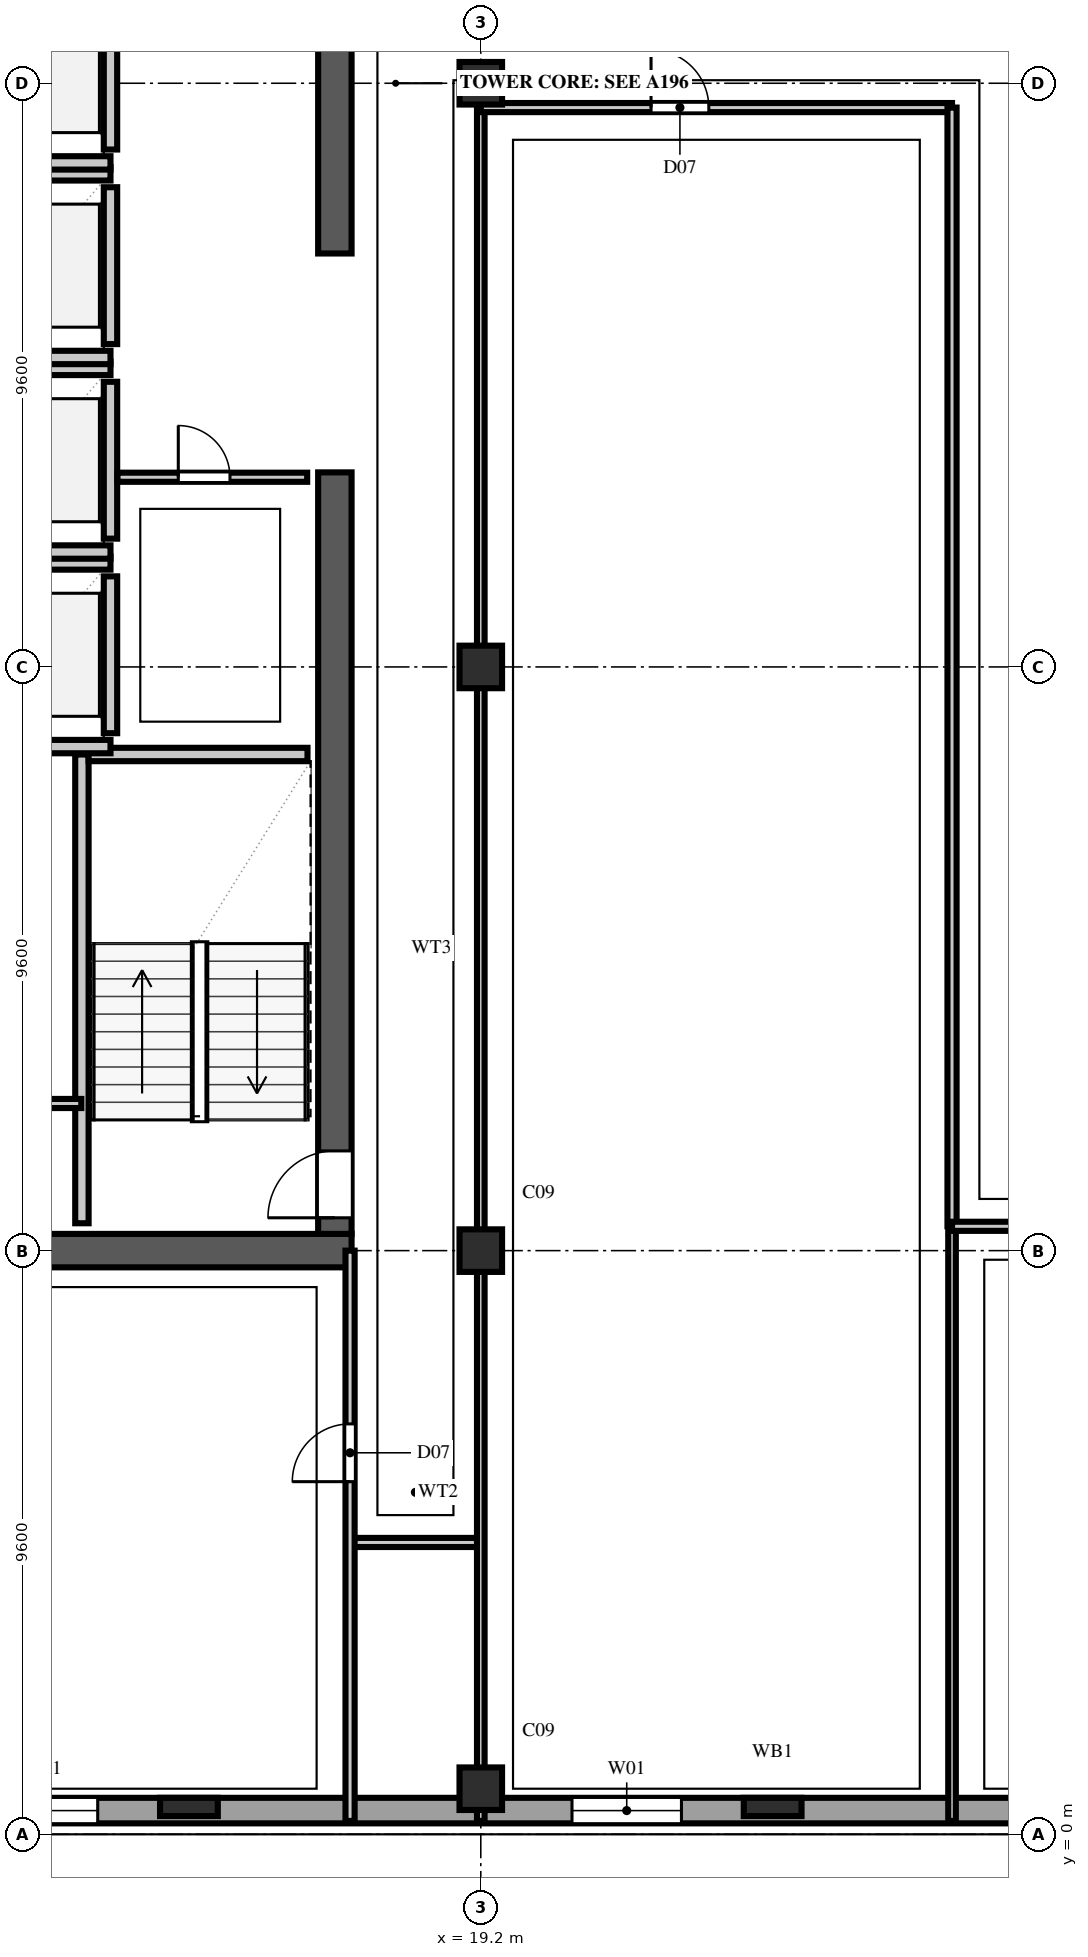
"""IFC4 building model, lengths in metres.
Left out: names, types, materials, properties, quantities, classifications, styles, units other than length and angle.
Written with IfcOpenShell. Run it as: python <this file> out.ifc"""

import sys

from ifc_helpers import new_model, si_unit, direction, frame, frame_2d, origin, origin_2d, place, context, subcontext, project, spatial, rectangle, extrude, element, fill, save


model = new_model("IFC4")
c1 = context("Model", 3, precision=1e-05, world=origin(), true_north=direction((0.0, 1.0)))
c2 = subcontext(c1, "Body", "Model", "MODEL_VIEW")
j1 = project(units=[si_unit("LENGTHUNIT", "METRE"), si_unit("PLANEANGLEUNIT", "RADIAN")], contexts=[c1])
p1 = place(None, origin())
s1 = spatial("IfcSite", under=j1, at=p1, CompositionType="ELEMENT")
p2 = place(p1, origin())
s2 = spatial("IfcBuilding", under=s1, at=p2, CompositionType="ELEMENT")
p3 = place(p2, frame((0.0, 0.0, 292.4)))
s3 = spatial("IfcBuildingStorey", under=s2, at=p3, CompositionType="ELEMENT", Elevation=292.4)
p4 = place(p3, frame((2.475, 9.6, 0.0), z_axis=(0.0, 0.0, 1.0), x_axis=(1.0, 0.0, 0.0)))
e1 = element("IfcWall", 1, at=p4, inside=s3, PredefinedType="SHEAR", context=c2, shape_type="SweptSolid", body=[
    extrude(rectangle(XDim=14.6, YDim=0.55, at=frame_2d((7.3, 0.0))), origin(), (0.0, 0.0, 1.0), 3.54),
])
p5 = place(p3, frame((16.8, 9.875, 0.0), z_axis=(0.0, 0.0, 1.0), x_axis=(0.0, 1.0, 0.0)))
e2 = element("IfcWall", 2, at=p5, inside=s3, PredefinedType="SHEAR", context=c2, shape_type="SweptSolid", body=[
    extrude(rectangle(XDim=12.525, YDim=0.55, at=frame_2d((6.262, 0.0))), origin(), (0.0, 0.0, 1.0), 3.54),
])
p6 = place(p5, frame((0.265, 0.0, 0.0)))
e3 = element("IfcOpeningElement", 3, at=p6, cuts=e2, PredefinedType="OPENING", context=c2, shape_type="SweptSolid", body=[
    extrude(rectangle(XDim=1.1, YDim=2.2, at=frame_2d((0.55, 1.1))), frame((0.0, 0.287, 0.0), z_axis=(0.0, -1.0, 0.0), x_axis=(1.0, 0.0, 0.0)), (0.0, 0.0, 1.0), 0.574),
])
p7 = place(p3, frame((16.8, 26.0, 0.0), z_axis=(0.0, 0.0, 1.0), x_axis=(0.0, 1.0, 0.0)))
e4 = element("IfcWall", 4, at=p7, inside=s3, PredefinedType="SHEAR", context=c2, shape_type="SweptSolid", body=[
    extrude(rectangle(XDim=7.8, YDim=0.55, at=frame_2d((3.9, 0.0))), origin(), (0.0, 0.0, 1.0), 3.54),
])
for number, where, z_axis, x_axis in (
    (5, (19.2, 0.75, 0.0), (0.0, 0.0, 1.0), (1.0, 0.0, 0.0)),
    (6, (19.2, 9.6, 0.0), (0.0, 0.0, 1.0), (1.0, 0.0, 0.0)),
    (7, (19.2, 19.2, 0.0), (0.0, 0.0, 1.0), (1.0, 0.0, 0.0)),
    (8, (19.2, 28.8, 0.0), (0.0, 0.0, 1.0), (1.0, 0.0, 0.0)),
):
    element("IfcColumn", number, at=place(p3, frame(where, z_axis=z_axis, x_axis=x_axis)), inside=s3, PredefinedType="COLUMN", context=c2, shape_type="SweptSolid", body=[
        extrude(rectangle(XDim=0.7, YDim=0.7, at=origin_2d()), origin(), (0.0, 0.0, 1.0), 3.8),
    ])
for number, where, z_axis, x_axis in (
    (9, (14.4, 0.45, 0.0), (0.0, 0.0, 1.0), (1.0, 0.0, 0.0)),
    (10, (24.0, 0.45, 0.0), (0.0, 0.0, 1.0), (1.0, 0.0, 0.0)),
):
    element("IfcColumn", number, at=place(p3, frame(where, z_axis=z_axis, x_axis=x_axis)), inside=s3, PredefinedType="PILASTER", context=c2, shape_type="SweptSolid", body=[
        extrude(rectangle(XDim=0.95, YDim=0.3, at=origin_2d()), origin(), (0.0, 0.0, 1.0), 3.8),
    ])
p8 = place(p3, frame((1.84, 0.39, 0.0), z_axis=(0.0, 0.0, 1.0), x_axis=(1.0, 0.0, 0.0)))
e11 = element("IfcWall", 11, at=p8, inside=s3, PredefinedType="SOLIDWALL", context=c2, shape_type="SweptSolid", body=[
    extrude(rectangle(XDim=44.32, YDim=0.42, at=frame_2d((22.16, 0.0))), origin(), (0.0, 0.0, 1.0), 3.54),
])
p9 = place(p8, frame((4.46, 0.0, 0.85)))
e12 = element("IfcOpeningElement", 12, at=p9, cuts=e11, PredefinedType="OPENING", context=c2, shape_type="SweptSolid", body=[
    extrude(rectangle(XDim=1.8, YDim=1.85, at=frame_2d((0.9, 0.925))), frame((0.0, 0.222, 0.0), z_axis=(0.0, -1.0, 0.0), x_axis=(1.0, 0.0, 0.0)), (0.0, 0.0, 1.0), 0.444),
])
p10 = place(p8, frame((9.26, 0.0, 0.85)))
e13 = element("IfcOpeningElement", 13, at=p10, cuts=e11, PredefinedType="OPENING", context=c2, shape_type="SweptSolid", body=[
    extrude(rectangle(XDim=1.8, YDim=1.85, at=frame_2d((0.9, 0.925))), frame((0.0, 0.222, 0.0), z_axis=(0.0, -1.0, 0.0), x_axis=(1.0, 0.0, 0.0)), (0.0, 0.0, 1.0), 0.444),
])
p11 = place(p8, frame((18.86, 0.0, 0.85)))
e14 = element("IfcOpeningElement", 14, at=p11, cuts=e11, PredefinedType="OPENING", context=c2, shape_type="SweptSolid", body=[
    extrude(rectangle(XDim=1.8, YDim=1.85, at=frame_2d((0.9, 0.925))), frame((0.0, 0.222, 0.0), z_axis=(0.0, -1.0, 0.0), x_axis=(1.0, 0.0, 0.0)), (0.0, 0.0, 1.0), 0.444),
])
p12 = place(p8, frame((28.46, 0.0, 0.85)))
e15 = element("IfcOpeningElement", 15, at=p12, cuts=e11, PredefinedType="OPENING", context=c2, shape_type="SweptSolid", body=[
    extrude(rectangle(XDim=1.8, YDim=1.85, at=frame_2d((0.9, 0.925))), frame((0.0, 0.222, 0.0), z_axis=(0.0, -1.0, 0.0), x_axis=(1.0, 0.0, 0.0)), (0.0, 0.0, 1.0), 0.444),
])
p13 = place(p8, frame((33.26, 0.0, 0.85)))
e16 = element("IfcOpeningElement", 16, at=p13, cuts=e11, PredefinedType="OPENING", context=c2, shape_type="SweptSolid", body=[
    extrude(rectangle(XDim=1.8, YDim=1.85, at=frame_2d((0.9, 0.925))), frame((0.0, 0.222, 0.0), z_axis=(0.0, -1.0, 0.0), x_axis=(1.0, 0.0, 0.0)), (0.0, 0.0, 1.0), 0.444),
])
p14 = place(p8, frame((38.06, 0.0, 0.85)))
e17 = element("IfcOpeningElement", 17, at=p14, cuts=e11, PredefinedType="OPENING", context=c2, shape_type="SweptSolid", body=[
    extrude(rectangle(XDim=1.8, YDim=1.85, at=frame_2d((0.9, 0.925))), frame((0.0, 0.222, 0.0), z_axis=(0.0, -1.0, 0.0), x_axis=(1.0, 0.0, 0.0)), (0.0, 0.0, 1.0), 0.444),
])
p15 = place(p3, frame((12.64, 10.05, 0.0), z_axis=(0.0, 0.0, 1.0), x_axis=(0.0, 1.0, 0.0)))
e18 = element("IfcWall", 18, at=p15, inside=s3, PredefinedType="SOLIDWALL", context=c2, shape_type="SweptSolid", body=[
    extrude(rectangle(XDim=7.71, YDim=0.22, at=frame_2d((3.855, 0.0))), origin(), (0.0, 0.0, 1.0), 3.54),
])
p16 = place(p3, frame((12.75, 17.76, 0.0), z_axis=(0.0, 0.0, 1.0), x_axis=(1.0, 0.0, 0.0)))
e19 = element("IfcWall", 19, at=p16, inside=s3, PredefinedType="SOLIDWALL", context=c2, shape_type="SweptSolid", body=[
    extrude(rectangle(XDim=3.6, YDim=0.22, at=frame_2d((1.8, 0.0))), origin(), (0.0, 0.0, 1.0), 3.54),
])
p17 = place(p3, frame((13.11, 18.11, 0.0), z_axis=(0.0, 0.0, 1.0), x_axis=(0.0, 1.0, 0.0)))
e20 = element("IfcWall", 20, at=p17, inside=s3, PredefinedType="SOLIDWALL", context=c2, shape_type="SweptSolid", body=[
    extrude(rectangle(XDim=2.58, YDim=0.22, at=frame_2d((1.29, 0.0))), origin(), (0.0, 0.0, 1.0), 3.54),
])
for number, where, z_axis, x_axis in (
    (21, (10.49, 17.89, 0.0), (0.0, 0.0, 1.0), (1.0, 0.0, 0.0)),
    (22, (10.49, 20.91, 0.0), (0.0, 0.0, 1.0), (1.0, 0.0, 0.0)),
):
    element("IfcWall", number, at=place(p3, frame(where, z_axis=z_axis, x_axis=x_axis)), inside=s3, PredefinedType="SOLIDWALL", context=c2, shape_type="SweptSolid", body=[
        extrude(rectangle(XDim=2.62, YDim=0.22, at=frame_2d((1.31, 0.0))), origin(), (0.0, 0.0, 1.0), 3.54),
    ])
p18 = place(p3, frame((13.11, 21.31, 0.0), z_axis=(0.0, 0.0, 1.0), x_axis=(0.0, 1.0, 0.0)))
e23 = element("IfcWall", 23, at=p18, inside=s3, PredefinedType="SOLIDWALL", context=c2, shape_type="SweptSolid", body=[
    extrude(rectangle(XDim=2.58, YDim=0.22, at=frame_2d((1.29, 0.0))), origin(), (0.0, 0.0, 1.0), 3.54),
])
for number, where, z_axis, x_axis in (
    (24, (10.49, 21.09, 0.0), (0.0, 0.0, 1.0), (1.0, 0.0, 0.0)),
    (25, (10.49, 24.11, 0.0), (0.0, 0.0, 1.0), (1.0, 0.0, 0.0)),
):
    element("IfcWall", number, at=place(p3, frame(where, z_axis=z_axis, x_axis=x_axis)), inside=s3, PredefinedType="SOLIDWALL", context=c2, shape_type="SweptSolid", body=[
        extrude(rectangle(XDim=2.62, YDim=0.22, at=frame_2d((1.31, 0.0))), origin(), (0.0, 0.0, 1.0), 3.54),
    ])
p19 = place(p3, frame((13.11, 24.51, 0.0), z_axis=(0.0, 0.0, 1.0), x_axis=(0.0, 1.0, 0.0)))
e26 = element("IfcWall", 26, at=p19, inside=s3, PredefinedType="SOLIDWALL", context=c2, shape_type="SweptSolid", body=[
    extrude(rectangle(XDim=2.58, YDim=0.22, at=frame_2d((1.29, 0.0))), origin(), (0.0, 0.0, 1.0), 3.54),
])
for number, where, z_axis, x_axis in (
    (27, (10.49, 24.29, 0.0), (0.0, 0.0, 1.0), (1.0, 0.0, 0.0)),
    (28, (10.49, 27.31, 0.0), (0.0, 0.0, 1.0), (1.0, 0.0, 0.0)),
):
    element("IfcWall", number, at=place(p3, frame(where, z_axis=z_axis, x_axis=x_axis)), inside=s3, PredefinedType="SOLIDWALL", context=c2, shape_type="SweptSolid", body=[
        extrude(rectangle(XDim=2.62, YDim=0.22, at=frame_2d((1.31, 0.0))), origin(), (0.0, 0.0, 1.0), 3.54),
    ])
p20 = place(p3, frame((13.11, 27.71, 0.0), z_axis=(0.0, 0.0, 1.0), x_axis=(0.0, 1.0, 0.0)))
e29 = element("IfcWall", 29, at=p20, inside=s3, PredefinedType="SOLIDWALL", context=c2, shape_type="SweptSolid", body=[
    extrude(rectangle(XDim=2.58, YDim=0.22, at=frame_2d((1.29, 0.0))), origin(), (0.0, 0.0, 1.0), 3.54),
])
p21 = place(p3, frame((10.49, 27.49, 0.0), z_axis=(0.0, 0.0, 1.0), x_axis=(1.0, 0.0, 0.0)))
e30 = element("IfcWall", 30, at=p21, inside=s3, PredefinedType="SOLIDWALL", context=c2, shape_type="SweptSolid", body=[
    extrude(rectangle(XDim=2.62, YDim=0.22, at=frame_2d((1.31, 0.0))), origin(), (0.0, 0.0, 1.0), 3.54),
])
p22 = place(p3, frame((10.55, 12.02, 0.0), z_axis=(0.0, 0.0, 1.0), x_axis=(1.0, 0.0, 0.0)))
e31 = element("IfcWall", 31, at=p22, inside=s3, PredefinedType="PARTITIONING", context=c2, shape_type="SweptSolid", body=[
    extrude(rectangle(XDim=2.08, YDim=0.15, at=frame_2d((1.04, 0.0))), origin(), (0.0, 0.0, 1.0), 3.54),
])
p23 = place(p22, frame((0.5, 0.0, 0.0)))
e32 = element("IfcOpeningElement", 32, at=p23, cuts=e31, PredefinedType="OPENING", context=c2, shape_type="SweptSolid", body=[
    extrude(rectangle(XDim=0.85, YDim=2.1, at=frame_2d((0.425, 1.05))), frame((0.0, 0.087, 0.0), z_axis=(0.0, -1.0, 0.0), x_axis=(1.0, 0.0, 0.0)), (0.0, 0.0, 1.0), 0.174),
])
p24 = place(p3, frame((13.225, 22.32, 0.0), z_axis=(0.0, 0.0, 1.0), x_axis=(1.0, 0.0, 0.0)))
e33 = element("IfcWall", 33, at=p24, inside=s3, PredefinedType="PARTITIONING", context=c2, shape_type="SweptSolid", body=[
    extrude(rectangle(XDim=3.12, YDim=0.15, at=frame_2d((1.56, 0.0))), origin(), (0.0, 0.0, 1.0), 3.54),
])
p25 = place(p24, frame((1.0, 0.0, 0.0)))
e34 = element("IfcOpeningElement", 34, at=p25, cuts=e33, PredefinedType="OPENING", context=c2, shape_type="SweptSolid", body=[
    extrude(rectangle(XDim=0.85, YDim=2.1, at=frame_2d((0.425, 1.05))), frame((0.0, 0.087, 0.0), z_axis=(0.0, -1.0, 0.0), x_axis=(1.0, 0.0, 0.0)), (0.0, 0.0, 1.0), 0.174),
])
p26 = place(p3, frame((17.05, 4.8, 0.0), z_axis=(0.0, 0.0, 1.0), x_axis=(1.0, 0.0, 0.0)))
e35 = element("IfcWall", 35, at=p26, inside=s3, PredefinedType="PARTITIONING", context=c2, shape_type="SweptSolid", body=[
    extrude(rectangle(XDim=2.15, YDim=0.15, at=frame_2d((1.075, 0.0))), origin(), (0.0, 0.0, 1.0), 3.54),
])
p27 = place(p3, frame((17.05, 0.22, 0.0), z_axis=(0.0, 0.0, 1.0), x_axis=(0.0, 1.0, 0.0)))
e36 = element("IfcWall", 36, at=p27, inside=s3, PredefinedType="PARTITIONING", context=c2, shape_type="SweptSolid", body=[
    extrude(rectangle(XDim=9.38, YDim=0.15, at=frame_2d((4.69, 0.0))), origin(), (0.0, 0.0, 1.0), 3.54),
])
p28 = place(p27, frame((5.58, 0.0, 0.0)))
e37 = element("IfcOpeningElement", 37, at=p28, cuts=e36, PredefinedType="OPENING", context=c2, shape_type="SweptSolid", body=[
    extrude(rectangle(XDim=0.95, YDim=2.15, at=frame_2d((0.475, 1.075))), frame((0.0, 0.087, 0.0), z_axis=(0.0, -1.0, 0.0), x_axis=(1.0, 0.0, 0.0)), (0.0, 0.0, 1.0), 0.174),
])
p29 = place(p3, frame((19.2, 0.22, 0.0), z_axis=(0.0, 0.0, 1.0), x_axis=(0.0, 1.0, 0.0)))
e38 = element("IfcWall", 38, at=p29, inside=s3, PredefinedType="PARTITIONING", context=c2, shape_type="SweptSolid", body=[
    extrude(rectangle(XDim=0.53, YDim=0.125, at=frame_2d((0.265, 0.0))), origin(), (0.0, 0.0, 1.0), 3.54),
])
p30 = place(p3, frame((19.2, 0.75, 0.0), z_axis=(0.0, 0.0, 1.0), x_axis=(0.0, 1.0, 0.0)))
e39 = element("IfcWall", 39, at=p30, inside=s3, PredefinedType="PARTITIONING", context=c2, shape_type="SweptSolid", body=[
    extrude(rectangle(XDim=27.65, YDim=0.125, at=frame_2d((13.825, 0.0))), origin(), (0.0, 0.0, 1.0), 3.184),
])
p31 = place(p3, frame((19.2, 28.4, 0.0), z_axis=(0.0, 0.0, 1.0), x_axis=(1.0, 0.0, 0.0)))
e40 = element("IfcWall", 40, at=p31, inside=s3, PredefinedType="PARTITIONING", context=c2, shape_type="SweptSolid", body=[
    extrude(rectangle(XDim=7.75, YDim=0.15, at=frame_2d((3.875, 0.0))), origin(), (0.0, 0.0, 1.0), 3.54),
])
p32 = place(p31, frame((2.8, 0.0, 0.0)))
e41 = element("IfcOpeningElement", 41, at=p32, cuts=e40, PredefinedType="OPENING", context=c2, shape_type="SweptSolid", body=[
    extrude(rectangle(XDim=0.95, YDim=2.15, at=frame_2d((0.475, 1.075))), frame((0.0, 0.087, 0.0), z_axis=(0.0, -1.0, 0.0), x_axis=(1.0, 0.0, 0.0)), (0.0, 0.0, 1.0), 0.174),
])
p33 = place(p3, frame((26.95, 0.22, 0.0), z_axis=(0.0, 0.0, 1.0), x_axis=(0.0, 1.0, 0.0)))
e42 = element("IfcWall", 42, at=p33, inside=s3, PredefinedType="PARTITIONING", context=c2, shape_type="SweptSolid", body=[
    extrude(rectangle(XDim=9.78, YDim=0.125, at=frame_2d((4.89, 0.0))), origin(), (0.0, 0.0, 1.0), 3.54),
])
p34 = place(p3, frame((26.95, 10.0, 0.0), z_axis=(0.0, 0.0, 1.0), x_axis=(0.0, 1.0, 0.0)))
e43 = element("IfcWall", 43, at=p34, inside=s3, PredefinedType="PARTITIONING", context=c2, shape_type="SweptSolid", body=[
    extrude(rectangle(XDim=18.4, YDim=0.15, at=frame_2d((9.2, 0.0))), origin(), (0.0, 0.0, 1.0), 3.54),
])
p35 = place(p3, frame((26.95, 10.0, 0.0), z_axis=(0.0, 0.0, 1.0), x_axis=(1.0, 0.0, 0.0)))
e44 = element("IfcWall", 44, at=p35, inside=s3, PredefinedType="PARTITIONING", context=c2, shape_type="SweptSolid", body=[
    extrude(rectangle(XDim=2.63, YDim=0.15, at=frame_2d((1.315, 0.0))), origin(), (0.0, 0.0, 1.0), 3.54),
])
p36 = place(p10, origin())
e45 = element("IfcWindow", 45, at=p36, inside=s3, PartitioningType="DOUBLE_PANEL_VERTICAL", PredefinedType="WINDOW", context=c2, shape_type="SweptSolid", body=[
    extrude(rectangle(XDim=1.8, YDim=1.85, at=frame_2d((0.9, 0.925))), frame((0.0, 0.11, 0.0), z_axis=(0.0, -1.0, 0.0), x_axis=(1.0, 0.0, 0.0)), (0.0, 0.0, 1.0), 0.06),
])
fill(e13, e45)
p37 = place(p11, origin())
e46 = element("IfcWindow", 46, at=p37, inside=s3, PartitioningType="DOUBLE_PANEL_VERTICAL", PredefinedType="WINDOW", context=c2, shape_type="SweptSolid", body=[
    extrude(rectangle(XDim=1.8, YDim=1.85, at=frame_2d((0.9, 0.925))), frame((0.0, 0.11, 0.0), z_axis=(0.0, -1.0, 0.0), x_axis=(1.0, 0.0, 0.0)), (0.0, 0.0, 1.0), 0.06),
])
fill(e14, e46)
p38 = place(p6, origin())
e47 = element("IfcDoor", 47, at=p38, inside=s3, OperationType="SINGLE_SWING_LEFT", PredefinedType="DOOR", context=c2, shape_type="SweptSolid", body=[
    extrude(rectangle(XDim=1.1, YDim=2.2, at=frame_2d((0.55, 1.1))), frame((0.0, 0.025, 0.0), z_axis=(0.0, -1.0, 0.0), x_axis=(1.0, 0.0, 0.0)), (0.0, 0.0, 1.0), 0.05),
])
fill(e3, e47)
p39 = place(p25, origin())
e48 = element("IfcDoor", 48, at=p39, inside=s3, OperationType="SINGLE_SWING_LEFT", PredefinedType="DOOR", context=c2, shape_type="SweptSolid", body=[
    extrude(rectangle(XDim=0.85, YDim=2.1, at=frame_2d((0.425, 1.05))), frame((0.0, 0.025, 0.0), z_axis=(0.0, -1.0, 0.0), x_axis=(1.0, 0.0, 0.0)), (0.0, 0.0, 1.0), 0.05),
])
fill(e34, e48)
p40 = place(p28, origin())
e49 = element("IfcDoor", 49, at=p40, inside=s3, OperationType="SINGLE_SWING_LEFT", PredefinedType="DOOR", context=c2, shape_type="SweptSolid", body=[
    extrude(rectangle(XDim=0.95, YDim=2.15, at=frame_2d((0.475, 1.075))), frame((0.0, 0.025, 0.0), z_axis=(0.0, -1.0, 0.0), x_axis=(1.0, 0.0, 0.0)), (0.0, 0.0, 1.0), 0.05),
])
fill(e37, e49)
p41 = place(p32, origin())
e50 = element("IfcDoor", 50, at=p41, inside=s3, OperationType="SINGLE_SWING_LEFT", PredefinedType="DOOR", context=c2, shape_type="SweptSolid", body=[
    extrude(rectangle(XDim=0.95, YDim=2.15, at=frame_2d((0.475, 1.075))), frame((0.0, 0.025, 0.0), z_axis=(0.0, -1.0, 0.0), x_axis=(1.0, 0.0, 0.0)), (0.0, 0.0, 1.0), 0.05),
])
fill(e41, e50)
save(model, sys.argv[1])
